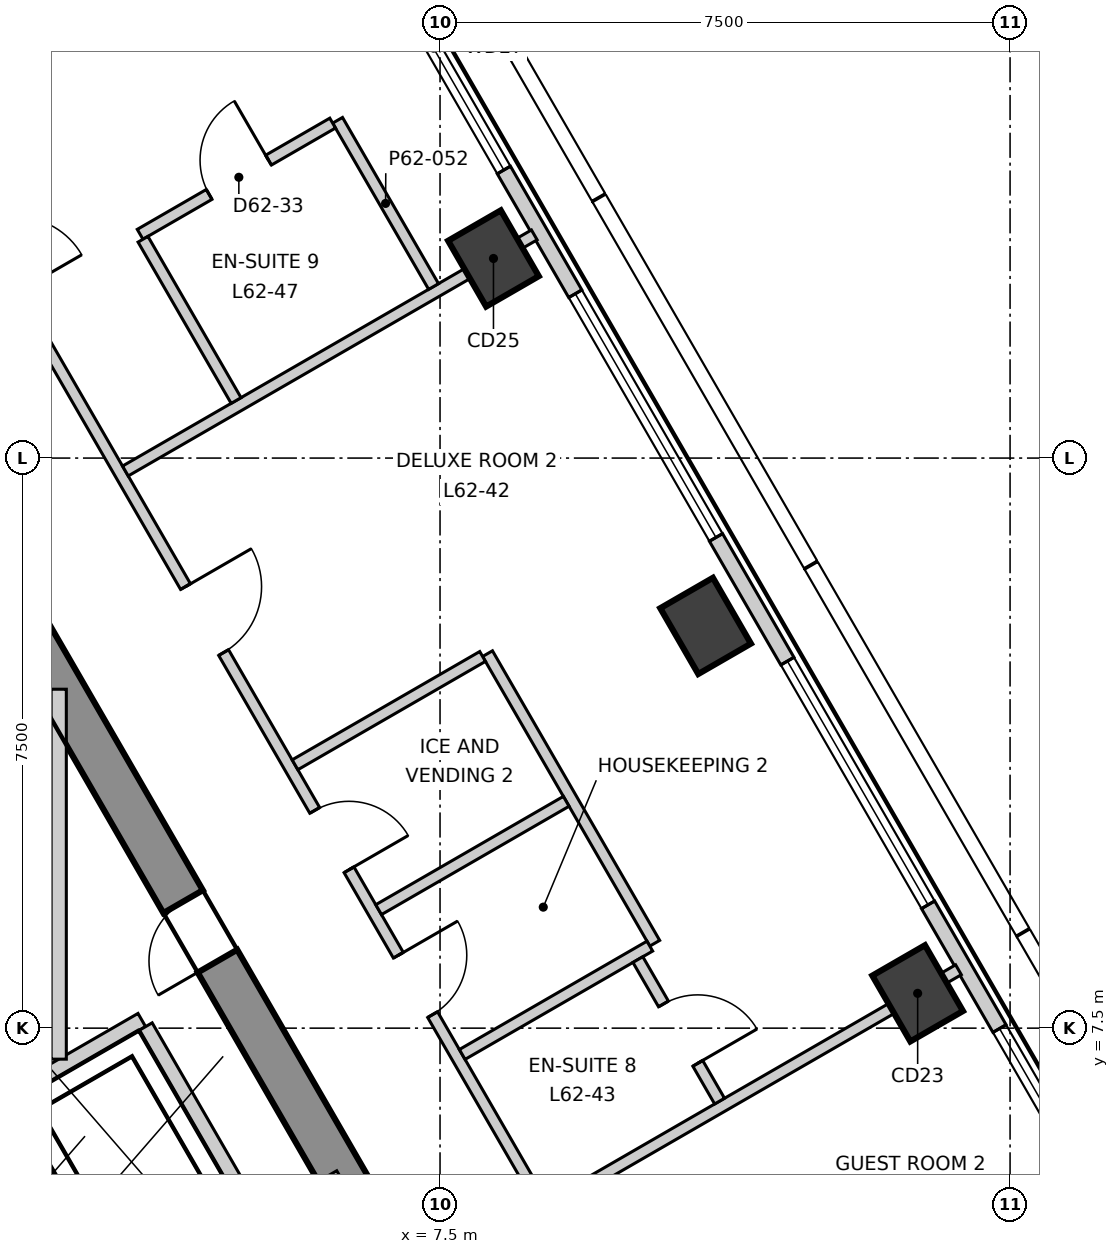
"""IFC4 building model, lengths in metres.
Left out: names, types, materials, properties, quantities, classifications, styles, units other than length and angle.
Written with IfcOpenShell. Run it as: python <this file> out.ifc"""

import sys

from ifc_helpers import new_model, si_unit, direction, frame, frame_2d, origin, origin_2d, place, context, subcontext, project, spatial, polyline, rectangle, outline, extrude, element, fill, save


model = new_model("IFC4")
c1 = context("Model", 3, precision=1e-05, world=origin(), true_north=direction((0.0, 1.0)))
c2 = subcontext(c1, "Body", "Model", "MODEL_VIEW")
j1 = project(units=[si_unit("LENGTHUNIT", "METRE"), si_unit("PLANEANGLEUNIT", "RADIAN")], contexts=[c1])
p1 = place(None, origin())
s1 = spatial("IfcSite", under=j1, at=p1, CompositionType="ELEMENT")
p2 = place(p1, origin())
s2 = spatial("IfcBuilding", under=s1, at=p2, CompositionType="ELEMENT")
p3 = place(p2, frame((0.0, 0.0, 268.3)))
s3 = spatial("IfcBuildingStorey", under=s2, at=p3, CompositionType="ELEMENT", Elevation=268.3)
p4 = place(p3, frame((12.384, -5.15, -0.3), z_axis=(0.0, 0.0, 1.0), x_axis=(-0.500000539815, 0.866025092122, 0.0)))
e1 = element("IfcWall", 1, at=p4, inside=s3, PredefinedType="SHEAR", context=c2, shape_type="SweptSolid", body=[
    extrude(outline(polyline([(-0.173, -0.301), (1.795, -0.301), (3.763, -0.301), (5.731, -0.301), (7.7, -0.301), (9.668, -0.301), (11.636, -0.301), (13.604, -0.3), (15.573, -0.3), (17.541, -0.3), (19.509, -0.3), (21.477, -0.3), (21.131, 0.3), (19.226, 0.3), (17.321, 0.3), (15.415, 0.3), (13.51, 0.3), (11.605, 0.3), (9.699, 0.3), (7.794, 0.3), (5.889, 0.3), (3.984, 0.3), (2.078, 0.3), (0.173, 0.3), (-0.173, -0.301)])), origin(), (0.0, 0.0, 1.0), 3.6),
])
p5 = place(p4, frame((15.627, 0.0, 0.3)))
e2 = element("IfcOpeningElement", 2, at=p5, cuts=e1, PredefinedType="OPENING", context=c2, shape_type="SweptSolid", body=[
    extrude(rectangle(XDim=0.9, YDim=2.1, at=frame_2d((0.45, 1.05))), frame((0.0, 0.31, 0.0), z_axis=(0.0, -1.0, 0.0), x_axis=(1.0, 0.0, 0.0)), (0.0, 0.0, 1.0), 0.621),
])
p6 = place(p4, frame((4.026, 0.0, 0.3)))
e3 = element("IfcOpeningElement", 3, at=p6, cuts=e1, PredefinedType="OPENING", context=c2, shape_type="SweptSolid", body=[
    extrude(rectangle(XDim=0.9, YDim=2.1, at=frame_2d((0.45, 1.05))), frame((0.0, 0.31, 0.0), z_axis=(0.0, -1.0, 0.0), x_axis=(1.0, 0.0, 0.0)), (0.0, 0.0, 1.0), 0.621),
])
for number, where, z_axis, x_axis in (
    (4, (13.784, 7.958, -0.3), (0.0, 0.0, 1.0), (-0.5, 0.866, 0.0)),
    (5, (10.994, 12.792, -0.3), (0.0, 0.0, 1.0), (-0.5, 0.866, 0.0)),
    (6, (8.203, 17.626, -0.3), (0.0, 0.0, 1.0), (-0.5, 0.866, 0.0)),
):
    element("IfcColumn", number, at=place(p3, frame(where, z_axis=z_axis, x_axis=x_axis)), inside=s3, PredefinedType="COLUMN", context=c2, shape_type="SweptSolid", body=[
        extrude(rectangle(XDim=1.0, YDim=0.8, at=origin_2d()), origin(), (0.0, 0.0, 1.0), 3.6),
    ])
p7 = place(p3, frame((26.205, -12.154, 0.0), z_axis=(0.0, 0.0, 1.0), x_axis=(-0.49999909388, 0.866025926932, 0.0)))
e7 = element("IfcWall", 7, at=p7, inside=s3, PredefinedType="ELEMENTEDWALL", context=c2, shape_type="SweptSolid", body=[
    extrude(rectangle(XDim=47.236, YDim=0.2, at=frame_2d((23.618, 0.0))), origin(), (0.0, 0.0, 1.0), 3.3),
])
p8 = place(p7, frame((2.243, 0.0, 0.9)))
e8 = element("IfcOpeningElement", 8, at=p8, cuts=e7, PredefinedType="OPENING", context=c2, shape_type="SweptSolid", body=[
    extrude(rectangle(XDim=3.7, YDim=2.2, at=frame_2d((1.85, 1.1))), frame((0.0, 0.11, 0.0), z_axis=(0.0, -1.0, 0.0), x_axis=(1.0, 0.0, 0.0)), (0.0, 0.0, 1.0), 0.22),
])
p9 = place(p7, frame((7.825, 0.0, 0.9)))
e9 = element("IfcOpeningElement", 9, at=p9, cuts=e7, PredefinedType="OPENING", context=c2, shape_type="SweptSolid", body=[
    extrude(rectangle(XDim=3.7, YDim=2.2, at=frame_2d((1.85, 1.1))), frame((0.0, 0.11, 0.0), z_axis=(0.0, -1.0, 0.0), x_axis=(1.0, 0.0, 0.0)), (0.0, 0.0, 1.0), 0.22),
])
p10 = place(p7, frame((13.406, 0.0, 0.9)))
e10 = element("IfcOpeningElement", 10, at=p10, cuts=e7, PredefinedType="OPENING", context=c2, shape_type="SweptSolid", body=[
    extrude(rectangle(XDim=3.7, YDim=2.2, at=frame_2d((1.85, 1.1))), frame((0.0, 0.11, 0.0), z_axis=(0.0, -1.0, 0.0), x_axis=(1.0, 0.0, 0.0)), (0.0, 0.0, 1.0), 0.22),
])
p11 = place(p7, frame((18.987, 0.0, 0.9)))
e11 = element("IfcOpeningElement", 11, at=p11, cuts=e7, PredefinedType="OPENING", context=c2, shape_type="SweptSolid", body=[
    extrude(rectangle(XDim=3.7, YDim=2.2, at=frame_2d((1.85, 1.1))), frame((0.0, 0.11, 0.0), z_axis=(0.0, -1.0, 0.0), x_axis=(1.0, 0.0, 0.0)), (0.0, 0.0, 1.0), 0.22),
])
p12 = place(p7, frame((24.569, 0.0, 0.9)))
e12 = element("IfcOpeningElement", 12, at=p12, cuts=e7, PredefinedType="OPENING", context=c2, shape_type="SweptSolid", body=[
    extrude(rectangle(XDim=3.7, YDim=2.2, at=frame_2d((1.85, 1.1))), frame((0.0, 0.11, 0.0), z_axis=(0.0, -1.0, 0.0), x_axis=(1.0, 0.0, 0.0)), (0.0, 0.0, 1.0), 0.22),
])
p13 = place(p7, frame((30.15, 0.0, 0.9)))
e13 = element("IfcOpeningElement", 13, at=p13, cuts=e7, PredefinedType="OPENING", context=c2, shape_type="SweptSolid", body=[
    extrude(rectangle(XDim=3.7, YDim=2.2, at=frame_2d((1.85, 1.1))), frame((0.0, 0.11, 0.0), z_axis=(0.0, -1.0, 0.0), x_axis=(1.0, 0.0, 0.0)), (0.0, 0.0, 1.0), 0.22),
])
p14 = place(p7, frame((35.732, 0.0, 0.9)))
e14 = element("IfcOpeningElement", 14, at=p14, cuts=e7, PredefinedType="OPENING", context=c2, shape_type="SweptSolid", body=[
    extrude(rectangle(XDim=3.7, YDim=2.2, at=frame_2d((1.85, 1.1))), frame((0.0, 0.11, 0.0), z_axis=(0.0, -1.0, 0.0), x_axis=(1.0, 0.0, 0.0)), (0.0, 0.0, 1.0), 0.22),
])
p15 = place(p7, frame((41.313, 0.0, 0.9)))
e15 = element("IfcOpeningElement", 15, at=p15, cuts=e7, PredefinedType="OPENING", context=c2, shape_type="SweptSolid", body=[
    extrude(rectangle(XDim=3.7, YDim=2.2, at=frame_2d((1.85, 1.1))), frame((0.0, 0.11, 0.0), z_axis=(0.0, -1.0, 0.0), x_axis=(1.0, 0.0, 0.0)), (0.0, 0.0, 1.0), 0.22),
])
p16 = place(p3, frame((8.942, 5.162, 0.0), z_axis=(0.0, 0.0, 1.0), x_axis=(0.866004272968, 0.500036597862, 0.0)))
e16 = element("IfcWall", 16, at=p16, inside=s3, PredefinedType="PARTITIONING", context=c2, shape_type="SweptSolid", body=[
    extrude(rectangle(XDim=6.211, YDim=0.15, at=frame_2d((3.106, 0.0))), origin(), (0.0, 0.0, 1.0), 2.8),
])
p17 = place(p3, frame((0.075, 20.37, 0.0), z_axis=(0.0, 0.0, 1.0), x_axis=(0.499988971979, -0.866031770721, 0.0)))
e17 = element("IfcWall", 17, at=p17, inside=s3, PredefinedType="PARTITIONING", context=c2, shape_type="SweptSolid", body=[
    extrude(rectangle(XDim=35.207, YDim=0.15, at=frame_2d((17.604, 0.0))), origin(), (0.0, 0.0, 1.0), 3.3),
])
p18 = place(p17, frame((31.606, 0.0, 0.0)))
e18 = element("IfcOpeningElement", 18, at=p18, cuts=e17, PredefinedType="OPENING", context=c2, shape_type="SweptSolid", body=[
    extrude(rectangle(XDim=1.0, YDim=2.1, at=frame_2d((0.5, 1.05))), frame((0.0, 0.085, 0.0), z_axis=(0.0, -1.0, 0.0), x_axis=(1.0, 0.0, 0.0)), (0.0, 0.0, 1.0), 0.17),
])
p19 = place(p17, frame((24.316, 0.0, 0.0)))
e19 = element("IfcOpeningElement", 19, at=p19, cuts=e17, PredefinedType="OPENING", context=c2, shape_type="SweptSolid", body=[
    extrude(rectangle(XDim=1.0, YDim=2.1, at=frame_2d((0.5, 1.05))), frame((0.0, 0.085, 0.0), z_axis=(0.0, -1.0, 0.0), x_axis=(1.0, 0.0, 0.0)), (0.0, 0.0, 1.0), 0.17),
])
p20 = place(p17, frame((18.735, 0.0, 0.0)))
e20 = element("IfcOpeningElement", 20, at=p20, cuts=e17, PredefinedType="OPENING", context=c2, shape_type="SweptSolid", body=[
    extrude(rectangle(XDim=1.0, YDim=2.1, at=frame_2d((0.5, 1.05))), frame((0.0, 0.085, 0.0), z_axis=(0.0, -1.0, 0.0), x_axis=(1.0, 0.0, 0.0)), (0.0, 0.0, 1.0), 0.17),
])
p21 = place(p17, frame((8.154, 0.0, 0.0)))
e21 = element("IfcOpeningElement", 21, at=p21, cuts=e17, PredefinedType="OPENING", context=c2, shape_type="SweptSolid", body=[
    extrude(rectangle(XDim=1.0, YDim=2.1, at=frame_2d((0.5, 1.05))), frame((0.0, 0.085, 0.0), z_axis=(0.0, -1.0, 0.0), x_axis=(1.0, 0.0, 0.0)), (0.0, 0.0, 1.0), 0.17),
])
p22 = place(p17, frame((13.754, 0.0, 0.0)))
e22 = element("IfcOpeningElement", 22, at=p22, cuts=e17, PredefinedType="OPENING", context=c2, shape_type="SweptSolid", body=[
    extrude(rectangle(XDim=0.9, YDim=2.1, at=frame_2d((0.45, 1.05))), frame((0.0, 0.085, 0.0), z_axis=(0.0, -1.0, 0.0), x_axis=(1.0, 0.0, 0.0)), (0.0, 0.0, 1.0), 0.17),
])
p23 = place(p17, frame((11.554, 0.0, 0.0)))
e23 = element("IfcOpeningElement", 23, at=p23, cuts=e17, PredefinedType="OPENING", context=c2, shape_type="SweptSolid", body=[
    extrude(rectangle(XDim=0.9, YDim=2.1, at=frame_2d((0.45, 1.05))), frame((0.0, 0.085, 0.0), z_axis=(0.0, -1.0, 0.0), x_axis=(1.0, 0.0, 0.0)), (0.0, 0.0, 1.0), 0.17),
])
p24 = place(p17, frame((2.69, 0.0, 0.0)))
e24 = element("IfcOpeningElement", 24, at=p24, cuts=e17, PredefinedType="OPENING", context=c2, shape_type="SweptSolid", body=[
    extrude(rectangle(XDim=1.0, YDim=2.1, at=frame_2d((0.5, 1.05))), frame((0.0, 0.085, 0.0), z_axis=(0.0, -1.0, 0.0), x_axis=(1.0, 0.0, 0.0)), (0.0, 0.0, 1.0), 0.17),
])
p25 = place(p3, frame((3.36, 14.83, 0.0), z_axis=(0.0, 0.0, 1.0), x_axis=(0.866033751423, 0.499985541187, 0.0)))
e25 = element("IfcWall", 25, at=p25, inside=s3, PredefinedType="PARTITIONING", context=c2, shape_type="SweptSolid", body=[
    extrude(rectangle(XDim=6.212, YDim=0.15, at=frame_2d((3.106, 0.0))), origin(), (0.0, 0.0, 1.0), 3.3),
])
p26 = place(p3, frame((8.125, 12.427, 0.0), z_axis=(0.0, 0.0, 1.0), x_axis=(0.500036278648, -0.866004457284, 0.0)))
e26 = element("IfcWall", 26, at=p26, inside=s3, PredefinedType="PARTITIONING", context=c2, shape_type="SweptSolid", body=[
    extrude(rectangle(XDim=4.4, YDim=0.15, at=frame_2d((2.2, 0.0))), origin(), (0.0, 0.0, 1.0), 3.3),
])
for number, where, z_axis, x_axis in (
    (27, (5.592, 10.965, 0.0), (0.0, 0.0, 1.0), (0.866, 0.5, 0.0)),
    (28, (6.692, 9.059, 0.0), (0.0, 0.0, 1.0), (0.866, 0.5, 0.0)),
    (29, (7.792, 7.154, 0.0), (0.0, 0.0, 1.0), (0.866, 0.5, 0.0)),
):
    element("IfcWall", number, at=place(p3, frame(where, z_axis=z_axis, x_axis=x_axis)), inside=s3, PredefinedType="PARTITIONING", context=c2, shape_type="SweptSolid", body=[
        extrude(rectangle(XDim=2.85, YDim=0.15, at=frame_2d((1.425, 0.0))), origin(), (0.0, 0.0, 1.0), 3.3),
    ])
p27 = place(p3, frame((6.152, 19.444, 0.0), z_axis=(0.0, 0.0, 1.0), x_axis=(0.500079482444, -0.865979509711, 0.0)))
e30 = element("IfcWall", 30, at=p27, inside=s3, PredefinedType="PARTITIONING", context=c2, shape_type="SweptSolid", body=[
    extrude(rectangle(XDim=2.525, YDim=0.15, at=frame_2d((1.263, 0.0))), origin(), (0.0, 0.0, 1.0), 3.3),
])
p28 = place(p3, frame((3.554, 17.944, 0.0), z_axis=(0.0, 0.0, 1.0), x_axis=(0.865953438489, 0.500124626836, 0.0)))
e31 = element("IfcWall", 31, at=p28, inside=s3, PredefinedType="PARTITIONING", context=c2, shape_type="SweptSolid", body=[
    extrude(rectangle(XDim=2.925, YDim=0.15, at=frame_2d((1.462, 0.0))), origin(), (0.0, 0.0, 1.0), 3.3),
])
p29 = place(p28, frame((1.05, 0.0, 0.0)))
e32 = element("IfcOpeningElement", 32, at=p29, cuts=e31, PredefinedType="OPENING", context=c2, shape_type="SweptSolid", body=[
    extrude(rectangle(XDim=0.9, YDim=2.1, at=frame_2d((0.45, 1.05))), frame((0.0, 0.085, 0.0), z_axis=(0.0, -1.0, 0.0), x_axis=(1.0, 0.0, 0.0)), (0.0, 0.0, 1.0), 0.17),
])
p30 = place(p3, frame((3.592, 17.879, 0.0), z_axis=(0.0, 0.0, 1.0), x_axis=(0.499943856944, -0.866057815567, 0.0)))
e33 = element("IfcWall", 33, at=p30, inside=s3, PredefinedType="PARTITIONING", context=c2, shape_type="SweptSolid", body=[
    extrude(rectangle(XDim=2.45, YDim=0.15, at=frame_2d((1.225, 0.0))), origin(), (0.0, 0.0, 1.0), 3.3),
])
p31 = place(p3, frame((10.103, 8.402, 0.0), z_axis=(0.0, 0.0, 1.0), x_axis=(0.499961633463, -0.866047553582, 0.0)))
e34 = element("IfcWall", 34, at=p31, inside=s3, PredefinedType="PARTITIONING", context=c2, shape_type="SweptSolid", body=[
    extrude(rectangle(XDim=2.15, YDim=0.15, at=frame_2d((1.075, 0.0))), origin(), (0.0, 0.0, 1.0), 3.3),
])
p32 = place(p31, frame((0.675, 0.0, 0.0)))
e35 = element("IfcOpeningElement", 35, at=p32, cuts=e34, PredefinedType="OPENING", context=c2, shape_type="SweptSolid", body=[
    extrude(rectangle(XDim=0.9, YDim=2.1, at=frame_2d((0.45, 1.05))), frame((0.0, 0.085, 0.0), z_axis=(0.0, -1.0, 0.0), x_axis=(1.0, 0.0, 0.0)), (0.0, 0.0, 1.0), 0.17),
])
p33 = place(p3, frame((-0.002, 5.541, 0.0), z_axis=(0.0, 0.0, 1.0), x_axis=(0.86600155993, 0.500041296494, 0.0)))
e36 = element("IfcWall", 36, at=p33, inside=s3, PredefinedType="SOLIDWALL", context=c2, shape_type="SweptSolid", body=[
    extrude(rectangle(XDim=4.132, YDim=0.2, at=frame_2d((2.066, 0.0))), origin(), (0.0, 0.0, 1.0), 3.3),
])
p34 = place(p3, frame((1.578, 2.874, 0.0), z_axis=(0.0, 0.0, 1.0), x_axis=(0.866045911672, 0.499964477614, 0.0)))
e37 = element("IfcWall", 37, at=p34, inside=s3, PredefinedType="SOLIDWALL", context=c2, shape_type="SweptSolid", body=[
    extrude(rectangle(XDim=5.327, YDim=0.2, at=frame_2d((2.663, 0.0))), origin(), (0.0, 0.0, 1.0), 3.3),
])
p35 = place(p34, frame((2.496, 0.0, 0.0)))
e38 = element("IfcOpeningElement", 38, at=p35, cuts=e37, PredefinedType="OPENING", context=c2, shape_type="SweptSolid", body=[
    extrude(rectangle(XDim=1.1, YDim=2.1, at=frame_2d((0.55, 1.05))), frame((0.0, 0.11, 0.0), z_axis=(0.0, -1.0, 0.0), x_axis=(1.0, 0.0, 0.0)), (0.0, 0.0, 1.0), 0.22),
])
for number, where, z_axis, x_axis in (
    (39, (1.807, 6.47, 0.0), (0.0, 0.0, 1.0), (0.5, -0.866, 0.0)),
    (40, (3.626, 7.52, 0.0), (0.0, 0.0, 1.0), (0.5, -0.866, 0.0)),
):
    element("IfcWall", number, at=place(p3, frame(where, z_axis=z_axis, x_axis=x_axis)), inside=s3, PredefinedType="SOLIDWALL", context=c2, shape_type="SweptSolid", body=[
        extrude(rectangle(XDim=2.9, YDim=0.2, at=frame_2d((1.45, 0.0))), origin(), (0.0, 0.0, 1.0), 3.3),
    ])
p36 = place(p3, frame((2.483, 7.092, 0.0), z_axis=(0.0, 0.0, 1.0), x_axis=(0.0, 1.0, 0.0)))
e41 = element("IfcWall", 41, at=p36, inside=s3, PredefinedType="SOLIDWALL", context=c2, shape_type="SweptSolid", body=[
    extrude(rectangle(XDim=4.867, YDim=0.2, at=frame_2d((2.434, 0.0))), origin(), (0.0, 0.0, 1.0), 3.3),
])
p37 = place(p11, origin())
e42 = element("IfcWindow", 42, at=p37, inside=s3, PartitioningType="SINGLE_PANEL", PredefinedType="WINDOW", context=c2, shape_type="SweptSolid", body=[
    extrude(rectangle(XDim=3.7, YDim=2.2, at=frame_2d((1.85, 1.1))), frame((0.0, 0.03, 0.0), z_axis=(0.0, -1.0, 0.0), x_axis=(1.0, 0.0, 0.0)), (0.0, 0.0, 1.0), 0.06),
])
fill(e11, e42)
p38 = place(p12, origin())
e43 = element("IfcWindow", 43, at=p38, inside=s3, PartitioningType="SINGLE_PANEL", PredefinedType="WINDOW", context=c2, shape_type="SweptSolid", body=[
    extrude(rectangle(XDim=3.7, YDim=2.2, at=frame_2d((1.85, 1.1))), frame((0.0, 0.03, 0.0), z_axis=(0.0, -1.0, 0.0), x_axis=(1.0, 0.0, 0.0)), (0.0, 0.0, 1.0), 0.06),
])
fill(e12, e43)
p39 = place(p13, origin())
e44 = element("IfcWindow", 44, at=p39, inside=s3, PartitioningType="SINGLE_PANEL", PredefinedType="WINDOW", context=c2, shape_type="SweptSolid", body=[
    extrude(rectangle(XDim=3.7, YDim=2.2, at=frame_2d((1.85, 1.1))), frame((0.0, 0.03, 0.0), z_axis=(0.0, -1.0, 0.0), x_axis=(1.0, 0.0, 0.0)), (0.0, 0.0, 1.0), 0.06),
])
fill(e13, e44)
p40 = place(p14, origin())
e45 = element("IfcWindow", 45, at=p40, inside=s3, PartitioningType="SINGLE_PANEL", PredefinedType="WINDOW", context=c2, shape_type="SweptSolid", body=[
    extrude(rectangle(XDim=3.7, YDim=2.2, at=frame_2d((1.85, 1.1))), frame((0.0, 0.03, 0.0), z_axis=(0.0, -1.0, 0.0), x_axis=(1.0, 0.0, 0.0)), (0.0, 0.0, 1.0), 0.06),
])
fill(e14, e45)
p41 = place(p21, origin())
e46 = element("IfcDoor", 46, at=p41, inside=s3, OperationType="SINGLE_SWING_RIGHT", PredefinedType="DOOR", context=c2, shape_type="SweptSolid", body=[
    extrude(rectangle(XDim=1.0, YDim=2.1, at=frame_2d((0.5, 1.05))), frame((0.0, 0.025, 0.0), z_axis=(0.0, -1.0, 0.0), x_axis=(1.0, 0.0, 0.0)), (0.0, 0.0, 1.0), 0.05),
])
fill(e21, e46)
p42 = place(p32, origin())
e47 = element("IfcDoor", 47, at=p42, inside=s3, OperationType="SINGLE_SWING_LEFT", PredefinedType="DOOR", context=c2, shape_type="SweptSolid", body=[
    extrude(rectangle(XDim=0.9, YDim=2.1, at=frame_2d((0.45, 1.05))), frame((0.0, 0.025, 0.0), z_axis=(0.0, -1.0, 0.0), x_axis=(1.0, 0.0, 0.0)), (0.0, 0.0, 1.0), 0.05),
])
fill(e35, e47)
p43 = place(p22, origin())
e48 = element("IfcDoor", 48, at=p43, inside=s3, OperationType="SINGLE_SWING_RIGHT", PredefinedType="DOOR", context=c2, shape_type="SweptSolid", body=[
    extrude(rectangle(XDim=0.9, YDim=2.1, at=frame_2d((0.45, 1.05))), frame((0.0, 0.025, 0.0), z_axis=(0.0, -1.0, 0.0), x_axis=(1.0, 0.0, 0.0)), (0.0, 0.0, 1.0), 0.05),
])
fill(e22, e48)
p44 = place(p23, origin())
e49 = element("IfcDoor", 49, at=p44, inside=s3, OperationType="SINGLE_SWING_LEFT", PredefinedType="DOOR", context=c2, shape_type="SweptSolid", body=[
    extrude(rectangle(XDim=0.9, YDim=2.1, at=frame_2d((0.45, 1.05))), frame((0.0, 0.025, 0.0), z_axis=(0.0, -1.0, 0.0), x_axis=(1.0, 0.0, 0.0)), (0.0, 0.0, 1.0), 0.05),
])
fill(e23, e49)
p45 = place(p29, origin())
e50 = element("IfcDoor", 50, at=p45, inside=s3, OperationType="SINGLE_SWING_LEFT", PredefinedType="DOOR", context=c2, shape_type="SweptSolid", body=[
    extrude(rectangle(XDim=0.9, YDim=2.1, at=frame_2d((0.45, 1.05))), frame((0.0, 0.025, 0.0), z_axis=(0.0, -1.0, 0.0), x_axis=(1.0, 0.0, 0.0)), (0.0, 0.0, 1.0), 0.05),
])
fill(e32, e50)
p46 = place(p5, origin())
e51 = element("IfcDoor", 51, at=p46, inside=s3, OperationType="SINGLE_SWING_RIGHT", PredefinedType="DOOR", context=c2, shape_type="SweptSolid", body=[
    extrude(rectangle(XDim=0.9, YDim=2.1, at=frame_2d((0.45, 1.05))), frame((0.0, 0.025, 0.0), z_axis=(0.0, -1.0, 0.0), x_axis=(1.0, 0.0, 0.0)), (0.0, 0.0, 1.0), 0.05),
])
fill(e2, e51)
save(model, sys.argv[1])
